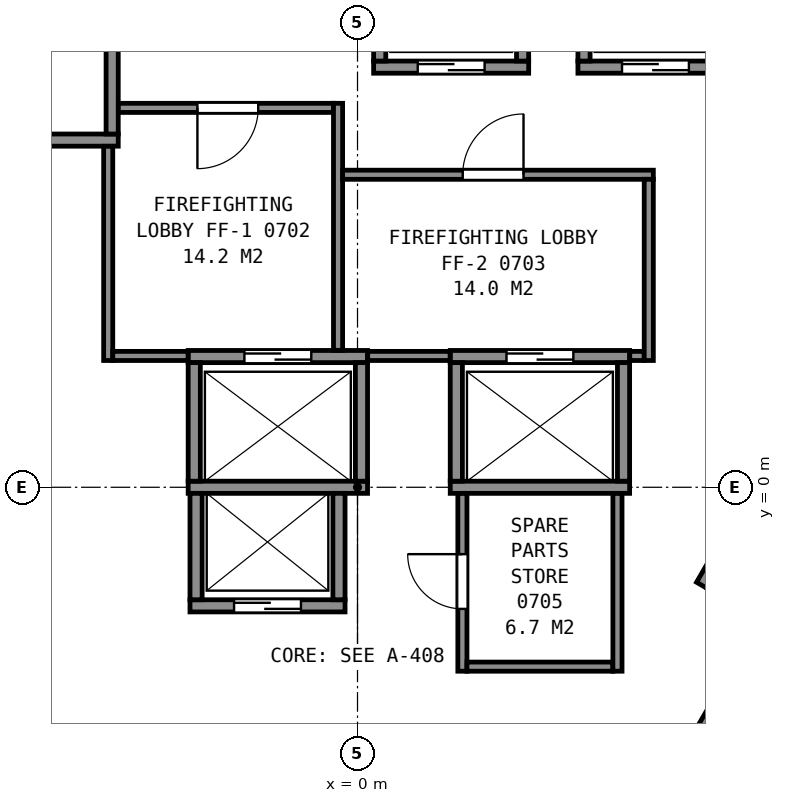
"""IFC4 building model, lengths in metres.
Left out: names, types, materials, properties, quantities, classifications, styles, units other than length and angle.
Written with IfcOpenShell. Run it as: python <this file> out.ifc"""

import sys

from ifc_helpers import new_model, si_unit, direction, frame, frame_2d, origin, place, context, subcontext, project, spatial, rectangle, extrude, element, fill, save


model = new_model("IFC4")
c1 = context("Model", 3, precision=1e-05, world=origin(), true_north=direction((0.0, 1.0)))
c2 = subcontext(c1, "Body", "Model", "MODEL_VIEW")
j1 = project(units=[si_unit("LENGTHUNIT", "METRE"), si_unit("PLANEANGLEUNIT", "RADIAN")], contexts=[c1])
p1 = place(None, origin())
s1 = spatial("IfcSite", under=j1, at=p1, CompositionType="ELEMENT")
p2 = place(p1, origin())
s2 = spatial("IfcBuilding", under=s1, at=p2, CompositionType="ELEMENT")
p3 = place(p2, frame((0.0, 0.0, 40.4)))
s3 = spatial("IfcBuildingStorey", under=s2, at=p3, CompositionType="ELEMENT", Elevation=40.4)
p4 = place(p3, frame((-2.755, -1.95, 0.0), z_axis=(0.0, 0.0, 1.0), x_axis=(1.0, 0.0, 0.0)))
e1 = element("IfcWall", 1, at=p4, inside=s3, PredefinedType="PARTITIONING", context=c2, shape_type="SweptSolid", body=[
    extrude(rectangle(XDim=2.55, YDim=0.2, at=frame_2d((1.275, 0.0))), origin(), (0.0, 0.0, 1.0), 3.6),
])
p5 = place(p4, frame((0.725, 0.0, 0.0)))
e2 = element("IfcOpeningElement", 2, at=p5, cuts=e1, PredefinedType="OPENING", context=c2, shape_type="SweptSolid", body=[
    extrude(rectangle(XDim=1.1, YDim=2.1, at=frame_2d((0.55, 1.05))), frame((0.0, 0.11, 0.0), z_axis=(0.0, -1.0, 0.0), x_axis=(1.0, 0.0, 0.0)), (0.0, 0.0, 1.0), 0.22),
])
p6 = place(p3, frame((-2.785, 0.0, 0.0), z_axis=(0.0, 0.0, 1.0), x_axis=(1.0, 0.0, 0.0)))
e3 = element("IfcWall", 3, at=p6, inside=s3, PredefinedType="PARTITIONING", context=c2, shape_type="SweptSolid", body=[
    extrude(rectangle(XDim=2.95, YDim=0.2, at=frame_2d((1.475, 0.0))), origin(), (0.0, 0.0, 1.0), 3.6),
])
p7 = place(p3, frame((1.525, 0.0, 0.0), z_axis=(0.0, 0.0, 1.0), x_axis=(1.0, 0.0, 0.0)))
e4 = element("IfcWall", 4, at=p7, inside=s3, PredefinedType="PARTITIONING", context=c2, shape_type="SweptSolid", body=[
    extrude(rectangle(XDim=2.95, YDim=0.2, at=frame_2d((1.475, 0.0))), origin(), (0.0, 0.0, 1.0), 3.6),
])
p8 = place(p3, frame((-2.785, 2.15, 0.0), z_axis=(0.0, 0.0, 1.0), x_axis=(1.0, 0.0, 0.0)))
e5 = element("IfcWall", 5, at=p8, inside=s3, PredefinedType="PARTITIONING", context=c2, shape_type="SweptSolid", body=[
    extrude(rectangle(XDim=2.95, YDim=0.2, at=frame_2d((1.475, 0.0))), origin(), (0.0, 0.0, 1.0), 3.6),
])
p9 = place(p8, frame((0.925, 0.0, 0.0)))
e6 = element("IfcOpeningElement", 6, at=p9, cuts=e5, PredefinedType="OPENING", context=c2, shape_type="SweptSolid", body=[
    extrude(rectangle(XDim=1.1, YDim=2.1, at=frame_2d((0.55, 1.05))), frame((0.0, 0.11, 0.0), z_axis=(0.0, -1.0, 0.0), x_axis=(1.0, 0.0, 0.0)), (0.0, 0.0, 1.0), 0.22),
])
p10 = place(p3, frame((1.525, 2.15, 0.0), z_axis=(0.0, 0.0, 1.0), x_axis=(1.0, 0.0, 0.0)))
e7 = element("IfcWall", 7, at=p10, inside=s3, PredefinedType="PARTITIONING", context=c2, shape_type="SweptSolid", body=[
    extrude(rectangle(XDim=2.95, YDim=0.2, at=frame_2d((1.475, 0.0))), origin(), (0.0, 0.0, 1.0), 3.6),
])
p11 = place(p10, frame((0.925, 0.0, 0.0)))
e8 = element("IfcOpeningElement", 8, at=p11, cuts=e7, PredefinedType="OPENING", context=c2, shape_type="SweptSolid", body=[
    extrude(rectangle(XDim=1.1, YDim=2.1, at=frame_2d((0.55, 1.05))), frame((0.0, 0.11, 0.0), z_axis=(0.0, -1.0, 0.0), x_axis=(1.0, 0.0, 0.0)), (0.0, 0.0, 1.0), 0.22),
])
p12 = place(p3, frame((-6.285, 5.71, 0.0), z_axis=(0.0, 0.0, 1.0), x_axis=(1.0, 0.0, 0.0)))
e9 = element("IfcWall", 9, at=p12, inside=s3, PredefinedType="PARTITIONING", context=c2, shape_type="SweptSolid", body=[
    extrude(rectangle(XDim=2.35, YDim=0.2, at=frame_2d((1.175, 0.0))), origin(), (0.0, 0.0, 1.0), 3.6),
])
p13 = place(p3, frame((0.265, 6.91, 0.0), z_axis=(0.0, 0.0, 1.0), x_axis=(1.0, 0.0, 0.0)))
e10 = element("IfcWall", 10, at=p13, inside=s3, PredefinedType="PARTITIONING", context=c2, shape_type="SweptSolid", body=[
    extrude(rectangle(XDim=2.55, YDim=0.2, at=frame_2d((1.275, 0.0))), origin(), (0.0, 0.0, 1.0), 3.6),
])
p14 = place(p13, frame((0.725, 0.0, 0.0)))
e11 = element("IfcOpeningElement", 11, at=p14, cuts=e10, PredefinedType="OPENING", context=c2, shape_type="SweptSolid", body=[
    extrude(rectangle(XDim=1.1, YDim=2.1, at=frame_2d((0.55, 1.05))), frame((0.0, 0.11, 0.0), z_axis=(0.0, -1.0, 0.0), x_axis=(1.0, 0.0, 0.0)), (0.0, 0.0, 1.0), 0.22),
])
p15 = place(p3, frame((3.625, 6.91, 0.0), z_axis=(0.0, 0.0, 1.0), x_axis=(1.0, 0.0, 0.0)))
e12 = element("IfcWall", 12, at=p15, inside=s3, PredefinedType="PARTITIONING", context=c2, shape_type="SweptSolid", body=[
    extrude(rectangle(XDim=2.55, YDim=0.2, at=frame_2d((1.275, 0.0))), origin(), (0.0, 0.0, 1.0), 3.6),
])
p16 = place(p15, frame((0.725, 0.0, 0.0)))
e13 = element("IfcOpeningElement", 13, at=p16, cuts=e12, PredefinedType="OPENING", context=c2, shape_type="SweptSolid", body=[
    extrude(rectangle(XDim=1.1, YDim=2.1, at=frame_2d((0.55, 1.05))), frame((0.0, 0.11, 0.0), z_axis=(0.0, -1.0, 0.0), x_axis=(1.0, 0.0, 0.0)), (0.0, 0.0, 1.0), 0.22),
])
p17 = place(p3, frame((5.527, -4.247, 0.0), z_axis=(0.0, 0.0, 1.0), x_axis=(0.499938297808, 0.866061024631, 0.0)))
e14 = element("IfcWall", 14, at=p17, inside=s3, PredefinedType="PARTITIONING", context=c2, shape_type="SweptSolid", body=[
    extrude(rectangle(XDim=2.35, YDim=0.2, at=frame_2d((1.175, 0.0))), origin(), (0.0, 0.0, 1.0), 3.6),
])
p18 = place(p17, frame((0.725, 0.0, 0.0)))
e15 = element("IfcOpeningElement", 15, at=p18, cuts=e14, PredefinedType="OPENING", context=c2, shape_type="SweptSolid", body=[
    extrude(rectangle(XDim=1.1, YDim=2.1, at=frame_2d((0.55, 1.05))), frame((0.0, 0.11, 0.0), z_axis=(0.0, -1.0, 0.0), x_axis=(1.0, 0.0, 0.0)), (0.0, 0.0, 1.0), 0.22),
])
p19 = place(p3, frame((5.663, -1.612, 0.0), z_axis=(0.0, 0.0, 1.0), x_axis=(0.49998122708, 0.866036242063, 0.0)))
e16 = element("IfcWall", 16, at=p19, inside=s3, PredefinedType="PARTITIONING", context=c2, shape_type="SweptSolid", body=[
    extrude(rectangle(XDim=4.9, YDim=0.2, at=frame_2d((2.45, 0.0))), origin(), (0.0, 0.0, 1.0), 3.6),
])
p20 = place(p3, frame((4.375, 0.1, 0.0), z_axis=(0.0, 0.0, 1.0), x_axis=(0.0, 1.0, 0.0)))
e17 = element("IfcWall", 17, at=p20, inside=s3, PredefinedType="PARTITIONING", context=c2, shape_type="SweptSolid", body=[
    extrude(rectangle(XDim=1.95, YDim=0.2, at=frame_2d((0.975, 0.0))), origin(), (0.0, 0.0, 1.0), 3.6),
])
for number, where, z_axis, x_axis in (
    (18, (3.725, 7.01, 0.0), (0.0, 0.0, 1.0), (0.0, 1.0, 0.0)),
    (19, (2.715, 7.01, 0.0), (0.0, 0.0, 1.0), (0.0, 1.0, 0.0)),
):
    element("IfcWall", number, at=place(p3, frame(where, z_axis=z_axis, x_axis=x_axis)), inside=s3, PredefinedType="PARTITIONING", context=c2, shape_type="SweptSolid", body=[
        extrude(rectangle(XDim=1.75, YDim=0.2, at=frame_2d((0.875, 0.0))), origin(), (0.0, 0.0, 1.0), 3.6),
    ])
p21 = place(p3, frame((1.625, 0.1, 0.0), z_axis=(0.0, 0.0, 1.0), x_axis=(0.0, 1.0, 0.0)))
e20 = element("IfcWall", 20, at=p21, inside=s3, PredefinedType="PARTITIONING", context=c2, shape_type="SweptSolid", body=[
    extrude(rectangle(XDim=1.95, YDim=0.2, at=frame_2d((0.975, 0.0))), origin(), (0.0, 0.0, 1.0), 3.6),
])
p22 = place(p3, frame((0.365, 7.01, 0.0), z_axis=(0.0, 0.0, 1.0), x_axis=(0.0, 1.0, 0.0)))
e21 = element("IfcWall", 21, at=p22, inside=s3, PredefinedType="PARTITIONING", context=c2, shape_type="SweptSolid", body=[
    extrude(rectangle(XDim=1.75, YDim=0.2, at=frame_2d((0.875, 0.0))), origin(), (0.0, 0.0, 1.0), 3.6),
])
p23 = place(p3, frame((0.065, 0.1, 0.0), z_axis=(0.0, 0.0, 1.0), x_axis=(0.0, 1.0, 0.0)))
e22 = element("IfcWall", 22, at=p23, inside=s3, PredefinedType="PARTITIONING", context=c2, shape_type="SweptSolid", body=[
    extrude(rectangle(XDim=1.95, YDim=0.2, at=frame_2d((0.975, 0.0))), origin(), (0.0, 0.0, 1.0), 3.6),
])
for number, where, z_axis, x_axis in (
    (23, (-0.305, -1.85, 0.0), (0.0, 0.0, 1.0), (0.0, 1.0, 0.0)),
    (24, (-2.655, -1.85, 0.0), (0.0, 0.0, 1.0), (0.0, 1.0, 0.0)),
):
    element("IfcWall", number, at=place(p3, frame(where, z_axis=z_axis, x_axis=x_axis)), inside=s3, PredefinedType="PARTITIONING", context=c2, shape_type="SweptSolid", body=[
        extrude(rectangle(XDim=1.75, YDim=0.2, at=frame_2d((0.875, 0.0))), origin(), (0.0, 0.0, 1.0), 3.6),
    ])
p24 = place(p3, frame((-2.685, 0.1, 0.0), z_axis=(0.0, 0.0, 1.0), x_axis=(0.0, 1.0, 0.0)))
e25 = element("IfcWall", 25, at=p24, inside=s3, PredefinedType="PARTITIONING", context=c2, shape_type="SweptSolid", body=[
    extrude(rectangle(XDim=1.95, YDim=0.2, at=frame_2d((0.975, 0.0))), origin(), (0.0, 0.0, 1.0), 3.6),
])
p25 = place(p3, frame((-4.035, 5.81, 0.0), z_axis=(0.0, 0.0, 1.0), x_axis=(0.0, 1.0, 0.0)))
e26 = element("IfcWall", 26, at=p25, inside=s3, PredefinedType="PARTITIONING", context=c2, shape_type="SweptSolid", body=[
    extrude(rectangle(XDim=1.75, YDim=0.2, at=frame_2d((0.875, 0.0))), origin(), (0.0, 0.0, 1.0), 3.6),
])
p26 = place(p3, frame((-13.664, 5.946, 0.0), z_axis=(0.0, 0.0, 1.0), x_axis=(0.499994327219, -0.866028678941, 0.0)))
e27 = element("IfcWall", 27, at=p26, inside=s3, PredefinedType="PARTITIONING", context=c2, shape_type="SweptSolid", body=[
    extrude(rectangle(XDim=23.968, YDim=0.2, at=frame_2d((11.984, 0.0))), origin(), (0.0, 0.0, 1.0), 3.35),
])
p27 = place(p3, frame((-4.152, -5.729, 0.0), z_axis=(0.0, 0.0, 1.0), x_axis=(-0.500024287448, 0.866011380966, 0.0)))
e28 = element("IfcWall", 28, at=p27, inside=s3, PredefinedType="PARTITIONING", context=c2, shape_type="SweptSolid", body=[
    extrude(rectangle(XDim=3.501, YDim=0.15, at=frame_2d((1.75, 0.0))), origin(), (0.0, 0.0, 1.0), 3.35),
])
p28 = place(p27, frame((2.026, 0.0, 0.0)))
e29 = element("IfcOpeningElement", 29, at=p28, cuts=e28, PredefinedType="OPENING", context=c2, shape_type="SweptSolid", body=[
    extrude(rectangle(XDim=0.9, YDim=2.1, at=frame_2d((0.45, 1.05))), frame((0.0, 0.085, 0.0), z_axis=(0.0, -1.0, 0.0), x_axis=(1.0, 0.0, 0.0)), (0.0, 0.0, 1.0), 0.17),
])
p29 = place(p27, frame((0.248, 0.0, 0.0)))
e30 = element("IfcOpeningElement", 30, at=p29, cuts=e28, PredefinedType="OPENING", context=c2, shape_type="SweptSolid", body=[
    extrude(rectangle(XDim=0.9, YDim=2.1, at=frame_2d((0.45, 1.05))), frame((0.0, 0.085, 0.0), z_axis=(0.0, -1.0, 0.0), x_axis=(1.0, 0.0, 0.0)), (0.0, 0.0, 1.0), 0.17),
])
p30 = place(p3, frame((-4.1, 2.085, 0.0), z_axis=(0.0, 0.0, 1.0), x_axis=(0.0, 1.0, 0.0)))
e31 = element("IfcWall", 31, at=p30, inside=s3, PredefinedType="PARTITIONING", context=c2, shape_type="SweptSolid", body=[
    extrude(rectangle(XDim=3.523, YDim=0.15, at=frame_2d((1.761, 0.0))), origin(), (0.0, 0.0, 1.0), 3.35),
])
p31 = place(p3, frame((-4.025, 2.16, 0.0), z_axis=(0.0, 0.0, 1.0), x_axis=(1.0, 0.0, 0.0)))
e32 = element("IfcWall", 32, at=p31, inside=s3, PredefinedType="PARTITIONING", context=c2, shape_type="SweptSolid", body=[
    extrude(rectangle(XDim=1.238, YDim=0.15, at=frame_2d((0.619, 0.0))), origin(), (0.0, 0.0, 1.0), 3.35),
])
p32 = place(p3, frame((-3.933, 6.24, 0.0), z_axis=(0.0, 0.0, 1.0), x_axis=(1.0, 0.0, 0.0)))
e33 = element("IfcWall", 33, at=p32, inside=s3, PredefinedType="PARTITIONING", context=c2, shape_type="SweptSolid", body=[
    extrude(rectangle(XDim=3.538, YDim=0.15, at=frame_2d((1.769, 0.0))), origin(), (0.0, 0.0, 1.0), 3.35),
])
p33 = place(p32, frame((1.3, 0.0, 0.0)))
e34 = element("IfcOpeningElement", 34, at=p33, cuts=e33, PredefinedType="OPENING", context=c2, shape_type="SweptSolid", body=[
    extrude(rectangle(XDim=1.0, YDim=2.1, at=frame_2d((0.5, 1.05))), frame((0.0, 0.085, 0.0), z_axis=(0.0, -1.0, 0.0), x_axis=(1.0, 0.0, 0.0)), (0.0, 0.0, 1.0), 0.17),
])
p34 = place(p3, frame((-0.32, 2.252, 0.0), z_axis=(0.0, 0.0, 1.0), x_axis=(0.0, 1.0, 0.0)))
e35 = element("IfcWall", 35, at=p34, inside=s3, PredefinedType="PARTITIONING", context=c2, shape_type="SweptSolid", body=[
    extrude(rectangle(XDim=4.063, YDim=0.15, at=frame_2d((2.031, 0.0))), origin(), (0.0, 0.0, 1.0), 3.35),
])
p35 = place(p3, frame((-0.245, 5.14, 0.0), z_axis=(0.0, 0.0, 1.0), x_axis=(1.0, 0.0, 0.0)))
e36 = element("IfcWall", 36, at=p35, inside=s3, PredefinedType="PARTITIONING", context=c2, shape_type="SweptSolid", body=[
    extrude(rectangle(XDim=5.11, YDim=0.15, at=frame_2d((2.555, 0.0))), origin(), (0.0, 0.0, 1.0), 3.35),
])
p36 = place(p35, frame((1.975, 0.0, 0.0)))
e37 = element("IfcOpeningElement", 37, at=p36, cuts=e36, PredefinedType="OPENING", context=c2, shape_type="SweptSolid", body=[
    extrude(rectangle(XDim=1.0, YDim=2.1, at=frame_2d((0.5, 1.05))), frame((0.0, 0.085, 0.0), z_axis=(0.0, -1.0, 0.0), x_axis=(1.0, 0.0, 0.0)), (0.0, 0.0, 1.0), 0.17),
])
p37 = place(p3, frame((0.167, 2.16, 0.0), z_axis=(0.0, 0.0, 1.0), x_axis=(1.0, 0.0, 0.0)))
e38 = element("IfcWall", 38, at=p37, inside=s3, PredefinedType="PARTITIONING", context=c2, shape_type="SweptSolid", body=[
    extrude(rectangle(XDim=1.356, YDim=0.15, at=frame_2d((0.678, 0.0))), origin(), (0.0, 0.0, 1.0), 3.35),
])
p38 = place(p3, frame((1.725, -0.102, 0.0), z_axis=(0.0, 0.0, 1.0), x_axis=(0.0, -1.0, 0.0)))
e39 = element("IfcWall", 39, at=p38, inside=s3, PredefinedType="PARTITIONING", context=c2, shape_type="SweptSolid", body=[
    extrude(rectangle(XDim=2.923, YDim=0.15, at=frame_2d((1.461, 0.0))), origin(), (0.0, 0.0, 1.0), 3.35),
])
p39 = place(p38, frame((0.998, 0.0, 0.0)))
e40 = element("IfcOpeningElement", 40, at=p39, cuts=e39, PredefinedType="OPENING", context=c2, shape_type="SweptSolid", body=[
    extrude(rectangle(XDim=0.9, YDim=2.1, at=frame_2d((0.45, 1.05))), frame((0.0, 0.085, 0.0), z_axis=(0.0, -1.0, 0.0), x_axis=(1.0, 0.0, 0.0)), (0.0, 0.0, 1.0), 0.17),
])
p40 = place(p3, frame((1.8, -2.95, 0.0), z_axis=(0.0, 0.0, 1.0), x_axis=(1.0, 0.0, 0.0)))
e41 = element("IfcWall", 41, at=p40, inside=s3, PredefinedType="PARTITIONING", context=c2, shape_type="SweptSolid", body=[
    extrude(rectangle(XDim=2.4, YDim=0.15, at=frame_2d((1.2, 0.0))), origin(), (0.0, 0.0, 1.0), 3.35),
])
p41 = place(p3, frame((4.275, -3.025, 0.0), z_axis=(0.0, 0.0, 1.0), x_axis=(0.0, 1.0, 0.0)))
e42 = element("IfcWall", 42, at=p41, inside=s3, PredefinedType="PARTITIONING", context=c2, shape_type="SweptSolid", body=[
    extrude(rectangle(XDim=2.923, YDim=0.15, at=frame_2d((1.461, 0.0))), origin(), (0.0, 0.0, 1.0), 3.35),
])
p42 = place(p3, frame((4.477, 2.16, 0.0), z_axis=(0.0, 0.0, 1.0), x_axis=(1.0, 0.0, 0.0)))
e43 = element("IfcWall", 43, at=p42, inside=s3, PredefinedType="PARTITIONING", context=c2, shape_type="SweptSolid", body=[
    extrude(rectangle(XDim=0.238, YDim=0.15, at=frame_2d((0.119, 0.0))), origin(), (0.0, 0.0, 1.0), 3.35),
])
p43 = place(p3, frame((4.79, 2.085, 0.0), z_axis=(0.0, 0.0, 1.0), x_axis=(0.0, 1.0, 0.0)))
e44 = element("IfcWall", 44, at=p43, inside=s3, PredefinedType="PARTITIONING", context=c2, shape_type="SweptSolid", body=[
    extrude(rectangle(XDim=2.98, YDim=0.15, at=frame_2d((1.49, 0.0))), origin(), (0.0, 0.0, 1.0), 3.35),
])
p44 = place(p3, frame((-3.766, -16.958, 0.0), z_axis=(0.0, 0.0, 1.0), x_axis=(-0.500024758804, 0.866011108811, 0.0)))
e45 = element("IfcWall", 45, at=p44, inside=s3, PredefinedType="PARTITIONING", context=c2, shape_type="SweptSolid", body=[
    extrude(rectangle(XDim=26.402, YDim=0.125, at=frame_2d((13.201, 0.0))), origin(), (0.0, 0.0, 1.0), 2.613),
])
p45 = place(p44, frame((25.139, 0.0, 0.0)))
e46 = element("IfcOpeningElement", 46, at=p45, cuts=e45, PredefinedType="OPENING", context=c2, shape_type="SweptSolid", body=[
    extrude(rectangle(XDim=0.9, YDim=2.1, at=frame_2d((0.45, 1.05))), frame((0.0, 0.073, 0.0), z_axis=(0.0, -1.0, 0.0), x_axis=(1.0, 0.0, 0.0)), (0.0, 0.0, 1.0), 0.145),
])
p46 = place(p44, frame((22.963, 0.0, 0.0)))
e47 = element("IfcOpeningElement", 47, at=p46, cuts=e45, PredefinedType="OPENING", context=c2, shape_type="SweptSolid", body=[
    extrude(rectangle(XDim=1.0, YDim=2.1, at=frame_2d((0.5, 1.05))), frame((0.0, 0.073, 0.0), z_axis=(0.0, -1.0, 0.0), x_axis=(1.0, 0.0, 0.0)), (0.0, 0.0, 1.0), 0.145),
])
p47 = place(p44, frame((15.228, 0.0, 0.0)))
e48 = element("IfcOpeningElement", 48, at=p47, cuts=e45, PredefinedType="OPENING", context=c2, shape_type="SweptSolid", body=[
    extrude(rectangle(XDim=0.9, YDim=2.1, at=frame_2d((0.45, 1.05))), frame((0.0, 0.073, 0.0), z_axis=(0.0, -1.0, 0.0), x_axis=(1.0, 0.0, 0.0)), (0.0, 0.0, 1.0), 0.145),
])
p48 = place(p44, frame((12.702, 0.0, 0.0)))
e49 = element("IfcOpeningElement", 49, at=p48, cuts=e45, PredefinedType="OPENING", context=c2, shape_type="SweptSolid", body=[
    extrude(rectangle(XDim=0.9, YDim=2.1, at=frame_2d((0.45, 1.05))), frame((0.0, 0.073, 0.0), z_axis=(0.0, -1.0, 0.0), x_axis=(1.0, 0.0, 0.0)), (0.0, 0.0, 1.0), 0.145),
])
p49 = place(p44, frame((5.624, 0.0, 0.0)))
e50 = element("IfcOpeningElement", 50, at=p49, cuts=e45, PredefinedType="OPENING", context=c2, shape_type="SweptSolid", body=[
    extrude(rectangle(XDim=0.9, YDim=2.1, at=frame_2d((0.45, 1.05))), frame((0.0, 0.073, 0.0), z_axis=(0.0, -1.0, 0.0), x_axis=(1.0, 0.0, 0.0)), (0.0, 0.0, 1.0), 0.145),
])
p50 = place(p44, frame((2.843, 0.0, 0.0)))
e51 = element("IfcOpeningElement", 51, at=p50, cuts=e45, PredefinedType="OPENING", context=c2, shape_type="SweptSolid", body=[
    extrude(rectangle(XDim=0.9, YDim=2.1, at=frame_2d((0.45, 1.05))), frame((0.0, 0.073, 0.0), z_axis=(0.0, -1.0, 0.0), x_axis=(1.0, 0.0, 0.0)), (0.0, 0.0, 1.0), 0.145),
])
p51 = place(p3, frame((16.967, 5.906, 0.0), z_axis=(0.0, 0.0, 1.0), x_axis=(-0.500024758804, -0.866011108811, 0.0)))
e52 = element("IfcWall", 52, at=p51, inside=s3, PredefinedType="PARTITIONING", context=c2, shape_type="SweptSolid", body=[
    extrude(rectangle(XDim=26.402, YDim=0.125, at=frame_2d((13.201, 0.0))), origin(), (0.0, 0.0, 1.0), 2.613),
])
p52 = place(p51, frame((24.689, 0.0, 0.0)))
e53 = element("IfcOpeningElement", 53, at=p52, cuts=e52, PredefinedType="OPENING", context=c2, shape_type="SweptSolid", body=[
    extrude(rectangle(XDim=0.9, YDim=2.1, at=frame_2d((0.45, 1.05))), frame((0.0, 0.073, 0.0), z_axis=(0.0, -1.0, 0.0), x_axis=(1.0, 0.0, 0.0)), (0.0, 0.0, 1.0), 0.145),
])
p53 = place(p51, frame((17.709, 0.0, 0.0)))
e54 = element("IfcOpeningElement", 54, at=p53, cuts=e52, PredefinedType="OPENING", context=c2, shape_type="SweptSolid", body=[
    extrude(rectangle(XDim=0.9, YDim=2.1, at=frame_2d((0.45, 1.05))), frame((0.0, 0.073, 0.0), z_axis=(0.0, -1.0, 0.0), x_axis=(1.0, 0.0, 0.0)), (0.0, 0.0, 1.0), 0.145),
])
p54 = place(p51, frame((14.928, 0.0, 0.0)))
e55 = element("IfcOpeningElement", 55, at=p54, cuts=e52, PredefinedType="OPENING", context=c2, shape_type="SweptSolid", body=[
    extrude(rectangle(XDim=0.9, YDim=2.1, at=frame_2d((0.45, 1.05))), frame((0.0, 0.073, 0.0), z_axis=(0.0, -1.0, 0.0), x_axis=(1.0, 0.0, 0.0)), (0.0, 0.0, 1.0), 0.145),
])
p55 = place(p51, frame((8.2, 0.0, 0.0)))
e56 = element("IfcOpeningElement", 56, at=p55, cuts=e52, PredefinedType="OPENING", context=c2, shape_type="SweptSolid", body=[
    extrude(rectangle(XDim=0.9, YDim=2.1, at=frame_2d((0.45, 1.05))), frame((0.0, 0.073, 0.0), z_axis=(0.0, -1.0, 0.0), x_axis=(1.0, 0.0, 0.0)), (0.0, 0.0, 1.0), 0.145),
])
p56 = place(p51, frame((5.473, 0.0, 0.0)))
e57 = element("IfcOpeningElement", 57, at=p56, cuts=e52, PredefinedType="OPENING", context=c2, shape_type="SweptSolid", body=[
    extrude(rectangle(XDim=1.0, YDim=2.1, at=frame_2d((0.5, 1.05))), frame((0.0, 0.073, 0.0), z_axis=(0.0, -1.0, 0.0), x_axis=(1.0, 0.0, 0.0)), (0.0, 0.0, 1.0), 0.145),
])
p57 = place(p14, origin())
e58 = element("IfcDoor", 58, at=p57, inside=s3, OperationType="SLIDING_TO_LEFT", PredefinedType="DOOR", context=c2, shape_type="SweptSolid", body=[
    extrude(rectangle(XDim=1.1, YDim=2.1, at=frame_2d((0.55, 1.05))), frame((0.0, 0.025, 0.0), z_axis=(0.0, -1.0, 0.0), x_axis=(1.0, 0.0, 0.0)), (0.0, 0.0, 1.0), 0.05),
])
fill(e11, e58)
p58 = place(p5, origin())
e59 = element("IfcDoor", 59, at=p58, inside=s3, OperationType="SLIDING_TO_RIGHT", PredefinedType="DOOR", context=c2, shape_type="SweptSolid", body=[
    extrude(rectangle(XDim=1.1, YDim=2.1, at=frame_2d((0.55, 1.05))), frame((0.0, 0.025, 0.0), z_axis=(0.0, -1.0, 0.0), x_axis=(1.0, 0.0, 0.0)), (0.0, 0.0, 1.0), 0.05),
])
fill(e2, e59)
p59 = place(p16, origin())
e60 = element("IfcDoor", 60, at=p59, inside=s3, OperationType="SLIDING_TO_LEFT", PredefinedType="DOOR", context=c2, shape_type="SweptSolid", body=[
    extrude(rectangle(XDim=1.1, YDim=2.1, at=frame_2d((0.55, 1.05))), frame((0.0, 0.025, 0.0), z_axis=(0.0, -1.0, 0.0), x_axis=(1.0, 0.0, 0.0)), (0.0, 0.0, 1.0), 0.05),
])
fill(e13, e60)
p60 = place(p9, origin())
e61 = element("IfcDoor", 61, at=p60, inside=s3, OperationType="SLIDING_TO_LEFT", PredefinedType="DOOR", context=c2, shape_type="SweptSolid", body=[
    extrude(rectangle(XDim=1.1, YDim=2.1, at=frame_2d((0.55, 1.05))), frame((0.0, 0.025, 0.0), z_axis=(0.0, -1.0, 0.0), x_axis=(1.0, 0.0, 0.0)), (0.0, 0.0, 1.0), 0.05),
])
fill(e6, e61)
p61 = place(p11, origin())
e62 = element("IfcDoor", 62, at=p61, inside=s3, OperationType="SLIDING_TO_RIGHT", PredefinedType="DOOR", context=c2, shape_type="SweptSolid", body=[
    extrude(rectangle(XDim=1.1, YDim=2.1, at=frame_2d((0.55, 1.05))), frame((0.0, 0.025, 0.0), z_axis=(0.0, -1.0, 0.0), x_axis=(1.0, 0.0, 0.0)), (0.0, 0.0, 1.0), 0.05),
])
fill(e8, e62)
p62 = place(p33, origin())
e63 = element("IfcDoor", 63, at=p62, inside=s3, OperationType="SINGLE_SWING_LEFT", PredefinedType="DOOR", context=c2, shape_type="SweptSolid", body=[
    extrude(rectangle(XDim=1.0, YDim=2.1, at=frame_2d((0.5, 1.05))), frame((0.0, 0.025, 0.0), z_axis=(0.0, -1.0, 0.0), x_axis=(1.0, 0.0, 0.0)), (0.0, 0.0, 1.0), 0.05),
])
fill(e34, e63)
p63 = place(p36, origin())
e64 = element("IfcDoor", 64, at=p63, inside=s3, OperationType="SINGLE_SWING_RIGHT", PredefinedType="DOOR", context=c2, shape_type="SweptSolid", body=[
    extrude(rectangle(XDim=1.0, YDim=2.1, at=frame_2d((0.5, 1.05))), frame((0.0, 0.025, 0.0), z_axis=(0.0, -1.0, 0.0), x_axis=(1.0, 0.0, 0.0)), (0.0, 0.0, 1.0), 0.05),
])
fill(e37, e64)
p64 = place(p39, origin())
e65 = element("IfcDoor", 65, at=p64, inside=s3, OperationType="SINGLE_SWING_LEFT", PredefinedType="DOOR", context=c2, shape_type="SweptSolid", body=[
    extrude(rectangle(XDim=0.9, YDim=2.1, at=frame_2d((0.45, 1.05))), frame((0.0, 0.025, 0.0), z_axis=(0.0, -1.0, 0.0), x_axis=(1.0, 0.0, 0.0)), (0.0, 0.0, 1.0), 0.05),
])
fill(e40, e65)
save(model, sys.argv[1])
